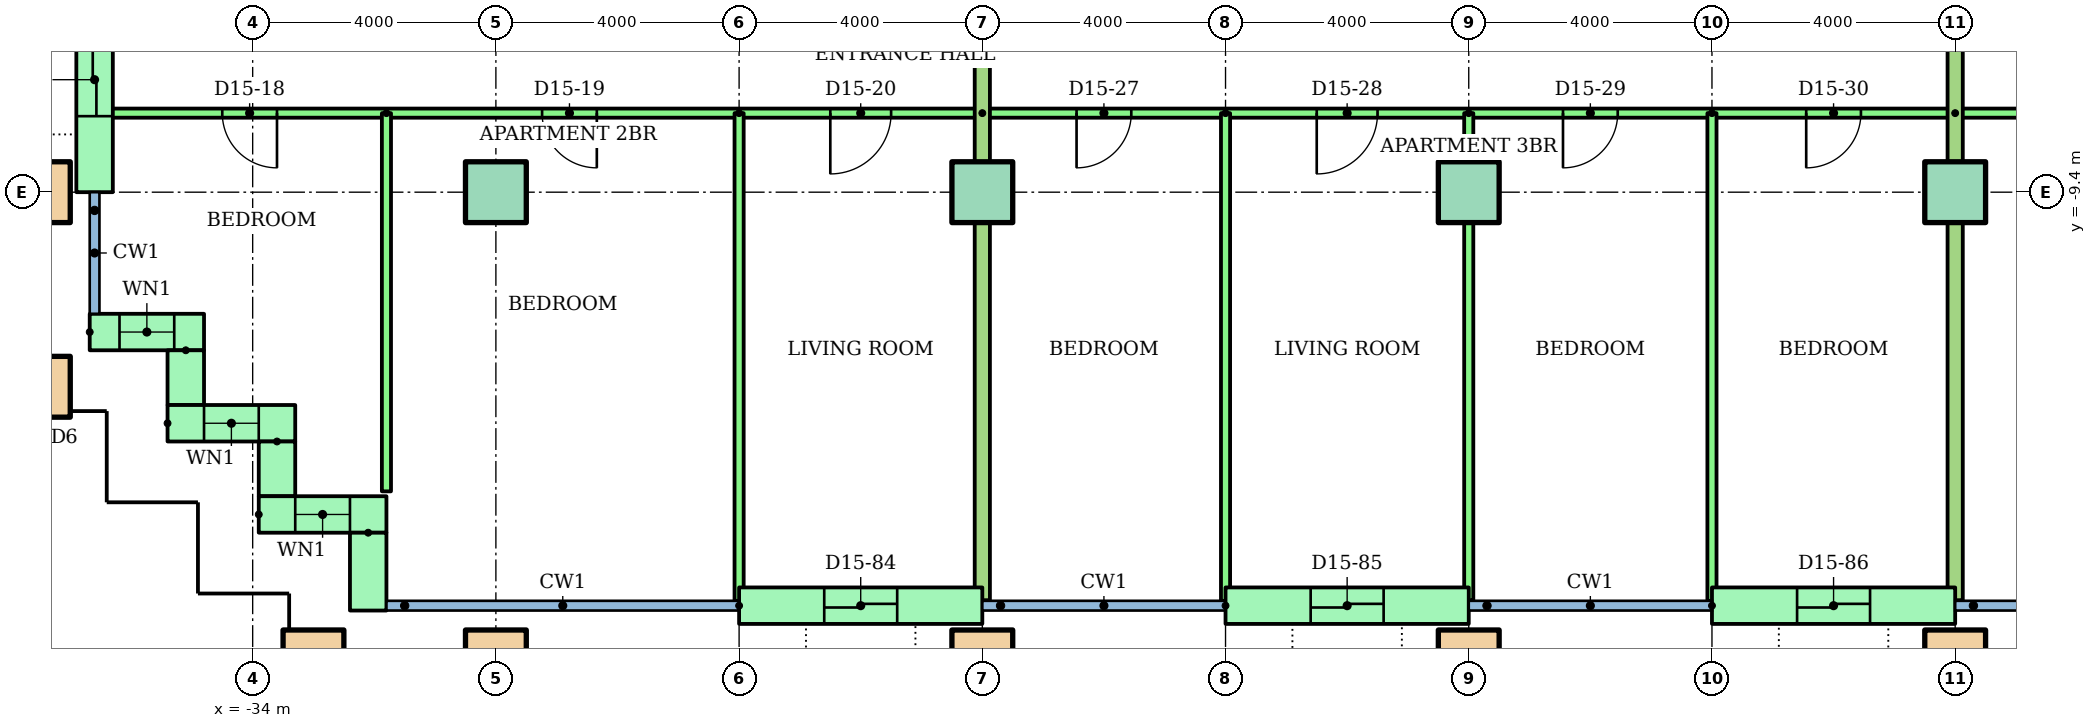
"""IFC4 building model, lengths in metres.
Left out: names, types, materials, properties, quantities, classifications, styles, units other than length and angle.
Written with IfcOpenShell. Run it as: python <this file> out.ifc"""

import sys

from ifc_helpers import new_model, si_unit, direction, frame, frame_2d, origin, origin_2d, place, context, subcontext, project, spatial, rectangle, hollow_rectangle, extrude, element, fill, save


model = new_model("IFC4")
c1 = context("Model", 3, precision=1e-05, world=origin(), true_north=direction((0.0, 1.0)))
c2 = subcontext(c1, "Body", "Model", "MODEL_VIEW")
j1 = project(units=[si_unit("LENGTHUNIT", "METRE"), si_unit("PLANEANGLEUNIT", "RADIAN")], contexts=[c1])
p1 = place(None, origin())
s1 = spatial("IfcSite", under=j1, at=p1, CompositionType="ELEMENT")
p2 = place(p1, origin())
s2 = spatial("IfcBuilding", under=s1, at=p2, CompositionType="ELEMENT")
p3 = place(p2, frame((0.0, 0.0, 57.6)))
s3 = spatial("IfcBuildingStorey", under=s2, at=p3, CompositionType="ELEMENT", Elevation=57.6)
for number, where in (
    (1, (-33.0, -17.1, 0.0)),
    (2, (-30.0, -17.1, 0.0)),
    (3, (-22.0, -17.1, 0.0)),
    (4, (-14.0, -17.1, 0.0)),
    (5, (-6.0, -17.1, 0.0)),
    (6, (-37.5, -12.6, 0.0)),
    (7, (-37.5, -9.4, 0.0)),
):
    element("IfcColumn", number, at=place(p3, frame(where)), inside=s3, PredefinedType="COLUMN", context=c2, shape_type="SweptSolid", body=[
        extrude(hollow_rectangle(XDim=1.0, YDim=1.0, WallThickness=0.05, at=origin_2d()), origin(), (0.0, 0.0, 1.0), 3.2),
    ])
for number, where in (
    (8, (-30.0, -9.4, 0.0)),
    (9, (-22.0, -9.4, 0.0)),
    (10, (-14.0, -9.4, 0.0)),
    (11, (-6.0, -9.4, 0.0)),
):
    element("IfcColumn", number, at=place(p3, frame(where)), inside=s3, PredefinedType="COLUMN", context=c2, shape_type="SweptSolid", body=[
        extrude(rectangle(XDim=1.0, YDim=1.0, at=origin_2d()), origin(), (0.0, 0.0, 1.0), 3.2),
    ])
p4 = place(p3, frame((-36.6, -5.7, 0.0), z_axis=(0.0, 0.0, 1.0), x_axis=(0.0, -1.0, 0.0)))
e12 = element("IfcWall", 12, at=p4, inside=s3, PredefinedType="STANDARD", context=c2, shape_type="SweptSolid", body=[
    extrude(rectangle(XDim=3.7, YDim=0.6, at=frame_2d((1.85, 0.0))), origin(), (0.0, 0.0, 1.0), 2.92),
])
p5 = place(p4, frame((1.25, 0.0, 0.0)))
e13 = element("IfcOpeningElement", 13, at=p5, cuts=e12, PredefinedType="OPENING", context=c2, shape_type="SweptSolid", body=[
    extrude(rectangle(XDim=1.2, YDim=2.1, at=frame_2d((0.6, 1.05))), frame((0.0, 0.31, 0.0), z_axis=(0.0, -1.0, 0.0), x_axis=(1.0, 0.0, 0.0)), (0.0, 0.0, 1.0), 0.62),
])
p6 = place(p3, frame((-36.68, -11.7, 0.0)))
e14 = element("IfcWall", 14, at=p6, inside=s3, PredefinedType="STANDARD", context=c2, shape_type="SweptSolid", body=[
    extrude(rectangle(XDim=1.88, YDim=0.6, at=frame_2d((0.94, 0.0))), origin(), (0.0, 0.0, 1.0), 2.92),
])
p7 = place(p6, frame((0.49, 0.0, 0.9)))
e15 = element("IfcOpeningElement", 15, at=p7, cuts=e14, PredefinedType="OPENING", context=c2, shape_type="SweptSolid", body=[
    extrude(rectangle(XDim=0.9, YDim=1.5, at=frame_2d((0.45, 0.75))), frame((0.0, 0.31, 0.0), z_axis=(0.0, -1.0, 0.0), x_axis=(1.0, 0.0, 0.0)), (0.0, 0.0, 1.0), 0.62),
])
p8 = place(p3, frame((-35.1, -12.0, 0.0), z_axis=(0.0, 0.0, 1.0), x_axis=(0.0, -1.0, 0.0)))
e16 = element("IfcWall", 16, at=p8, inside=s3, PredefinedType="STANDARD", context=c2, shape_type="SweptSolid", body=[
    extrude(rectangle(XDim=0.9, YDim=0.6, at=frame_2d((0.45, 0.0))), origin(), (0.0, 0.0, 1.0), 2.92),
])
p9 = place(p3, frame((-35.4, -13.2, 0.0)))
e17 = element("IfcWall", 17, at=p9, inside=s3, PredefinedType="STANDARD", context=c2, shape_type="SweptSolid", body=[
    extrude(rectangle(XDim=2.1, YDim=0.6, at=frame_2d((1.05, 0.0))), origin(), (0.0, 0.0, 1.0), 2.92),
])
p10 = place(p9, frame((0.6, 0.0, 0.9)))
e18 = element("IfcOpeningElement", 18, at=p10, cuts=e17, PredefinedType="OPENING", context=c2, shape_type="SweptSolid", body=[
    extrude(rectangle(XDim=0.9, YDim=1.5, at=frame_2d((0.45, 0.75))), frame((0.0, 0.31, 0.0), z_axis=(0.0, -1.0, 0.0), x_axis=(1.0, 0.0, 0.0)), (0.0, 0.0, 1.0), 0.62),
])
p11 = place(p3, frame((-33.6, -13.5, 0.0), z_axis=(0.0, 0.0, 1.0), x_axis=(0.0, -1.0, 0.0)))
e19 = element("IfcWall", 19, at=p11, inside=s3, PredefinedType="STANDARD", context=c2, shape_type="SweptSolid", body=[
    extrude(rectangle(XDim=0.9, YDim=0.6, at=frame_2d((0.45, 0.0))), origin(), (0.0, 0.0, 1.0), 2.92),
])
p12 = place(p3, frame((-33.9, -14.7, 0.0)))
e20 = element("IfcWall", 20, at=p12, inside=s3, PredefinedType="STANDARD", context=c2, shape_type="SweptSolid", body=[
    extrude(rectangle(XDim=2.1, YDim=0.6, at=frame_2d((1.05, 0.0))), origin(), (0.0, 0.0, 1.0), 2.92),
])
p13 = place(p12, frame((0.6, 0.0, 0.9)))
e21 = element("IfcOpeningElement", 21, at=p13, cuts=e20, PredefinedType="OPENING", context=c2, shape_type="SweptSolid", body=[
    extrude(rectangle(XDim=0.9, YDim=1.5, at=frame_2d((0.45, 0.75))), frame((0.0, 0.31, 0.0), z_axis=(0.0, -1.0, 0.0), x_axis=(1.0, 0.0, 0.0)), (0.0, 0.0, 1.0), 0.62),
])
p14 = place(p3, frame((-32.1, -15.0, 0.0), z_axis=(0.0, 0.0, 1.0), x_axis=(0.0, -1.0, 0.0)))
e22 = element("IfcWall", 22, at=p14, inside=s3, PredefinedType="STANDARD", context=c2, shape_type="SweptSolid", body=[
    extrude(rectangle(XDim=1.28, YDim=0.6, at=frame_2d((0.64, 0.0))), origin(), (0.0, 0.0, 1.0), 2.92),
])
p15 = place(p3, frame((-26.0, -16.2, 0.0)))
e23 = element("IfcWall", 23, at=p15, inside=s3, PredefinedType="STANDARD", context=c2, shape_type="SweptSolid", body=[
    extrude(rectangle(XDim=4.0, YDim=0.6, at=frame_2d((2.0, 0.0))), origin(), (0.0, 0.0, 1.0), 2.92),
])
p16 = place(p15, frame((1.4, 0.0, 0.0)))
e24 = element("IfcOpeningElement", 24, at=p16, cuts=e23, PredefinedType="OPENING", context=c2, shape_type="SweptSolid", body=[
    extrude(rectangle(XDim=1.2, YDim=2.1, at=frame_2d((0.6, 1.05))), frame((0.0, 0.31, 0.0), z_axis=(0.0, -1.0, 0.0), x_axis=(1.0, 0.0, 0.0)), (0.0, 0.0, 1.0), 0.62),
])
p17 = place(p3, frame((-18.0, -16.2, 0.0)))
e25 = element("IfcWall", 25, at=p17, inside=s3, PredefinedType="STANDARD", context=c2, shape_type="SweptSolid", body=[
    extrude(rectangle(XDim=4.0, YDim=0.6, at=frame_2d((2.0, 0.0))), origin(), (0.0, 0.0, 1.0), 2.92),
])
p18 = place(p17, frame((1.4, 0.0, 0.0)))
e26 = element("IfcOpeningElement", 26, at=p18, cuts=e25, PredefinedType="OPENING", context=c2, shape_type="SweptSolid", body=[
    extrude(rectangle(XDim=1.2, YDim=2.1, at=frame_2d((0.6, 1.05))), frame((0.0, 0.31, 0.0), z_axis=(0.0, -1.0, 0.0), x_axis=(1.0, 0.0, 0.0)), (0.0, 0.0, 1.0), 0.62),
])
p19 = place(p3, frame((-10.0, -16.2, 0.0)))
e27 = element("IfcWall", 27, at=p19, inside=s3, PredefinedType="STANDARD", context=c2, shape_type="SweptSolid", body=[
    extrude(rectangle(XDim=4.0, YDim=0.6, at=frame_2d((2.0, 0.0))), origin(), (0.0, 0.0, 1.0), 2.92),
])
p20 = place(p19, frame((1.4, 0.0, 0.0)))
e28 = element("IfcOpeningElement", 28, at=p20, cuts=e27, PredefinedType="OPENING", context=c2, shape_type="SweptSolid", body=[
    extrude(rectangle(XDim=1.2, YDim=2.1, at=frame_2d((0.6, 1.05))), frame((0.0, 0.31, 0.0), z_axis=(0.0, -1.0, 0.0), x_axis=(1.0, 0.0, 0.0)), (0.0, 0.0, 1.0), 0.62),
])
p21 = place(p3, frame((-22.0, -8.1, 0.0), z_axis=(0.0, 0.0, 1.0), x_axis=(-1.0, 0.0, 0.0)))
e29 = element("IfcWall", 29, at=p21, inside=s3, PredefinedType="PARTITIONING", context=c2, shape_type="SweptSolid", body=[
    extrude(rectangle(XDim=14.51, YDim=0.15, at=frame_2d((7.255, 0.0))), origin(), (0.0, 0.0, 1.0), 2.4),
])
p22 = place(p21, frame((11.6, 0.0, 0.0)))
e30 = element("IfcOpeningElement", 30, at=p22, cuts=e29, PredefinedType="OPENING", context=c2, shape_type="SweptSolid", body=[
    extrude(rectangle(XDim=0.9, YDim=2.1, at=frame_2d((0.45, 1.05))), frame((0.0, 0.085, 0.0), z_axis=(0.0, -1.0, 0.0), x_axis=(1.0, 0.0, 0.0)), (0.0, 0.0, 1.0), 0.17),
])
p23 = place(p21, frame((6.34, 0.0, 0.0)))
e31 = element("IfcOpeningElement", 31, at=p23, cuts=e29, PredefinedType="OPENING", context=c2, shape_type="SweptSolid", body=[
    extrude(rectangle(XDim=0.9, YDim=2.1, at=frame_2d((0.45, 1.05))), frame((0.0, 0.085, 0.0), z_axis=(0.0, -1.0, 0.0), x_axis=(1.0, 0.0, 0.0)), (0.0, 0.0, 1.0), 0.17),
])
p24 = place(p21, frame((1.5, 0.0, 0.0)))
e32 = element("IfcOpeningElement", 32, at=p24, cuts=e29, PredefinedType="OPENING", context=c2, shape_type="SweptSolid", body=[
    extrude(rectangle(XDim=1.0, YDim=2.1, at=frame_2d((0.5, 1.05))), frame((0.0, 0.085, 0.0), z_axis=(0.0, -1.0, 0.0), x_axis=(1.0, 0.0, 0.0)), (0.0, 0.0, 1.0), 0.17),
])
p25 = place(p3, frame((-31.8, -8.1, 0.0), z_axis=(0.0, 0.0, 1.0), x_axis=(0.0, -1.0, 0.0)))
e33 = element("IfcWall", 33, at=p25, inside=s3, PredefinedType="PARTITIONING", context=c2, shape_type="SweptSolid", body=[
    extrude(rectangle(XDim=6.22, YDim=0.15, at=frame_2d((3.11, 0.0))), origin(), (0.0, 0.0, 1.0), 2.4),
])
p26 = place(p3, frame((-26.0, -8.1, 0.0), z_axis=(0.0, 0.0, 1.0), x_axis=(0.0, -1.0, 0.0)))
e34 = element("IfcWall", 34, at=p26, inside=s3, PredefinedType="PARTITIONING", context=c2, shape_type="SweptSolid", body=[
    extrude(rectangle(XDim=8.021, YDim=0.15, at=frame_2d((4.01, 0.0))), origin(), (0.0, 0.0, 1.0), 2.4),
])
p27 = place(p3, frame((-6.0, -8.1, 0.0), z_axis=(0.0, 0.0, 1.0), x_axis=(-1.0, 0.0, 0.0)))
e35 = element("IfcWall", 35, at=p27, inside=s3, PredefinedType="PARTITIONING", context=c2, shape_type="SweptSolid", body=[
    extrude(rectangle(XDim=16.0, YDim=0.15, at=frame_2d((8.0, 0.0))), origin(), (0.0, 0.0, 1.0), 2.4),
])
p28 = place(p27, frame((13.55, 0.0, 0.0)))
e36 = element("IfcOpeningElement", 36, at=p28, cuts=e35, PredefinedType="OPENING", context=c2, shape_type="SweptSolid", body=[
    extrude(rectangle(XDim=0.9, YDim=2.1, at=frame_2d((0.45, 1.05))), frame((0.0, 0.085, 0.0), z_axis=(0.0, -1.0, 0.0), x_axis=(1.0, 0.0, 0.0)), (0.0, 0.0, 1.0), 0.17),
])
p29 = place(p27, frame((9.5, 0.0, 0.0)))
e37 = element("IfcOpeningElement", 37, at=p29, cuts=e35, PredefinedType="OPENING", context=c2, shape_type="SweptSolid", body=[
    extrude(rectangle(XDim=1.0, YDim=2.1, at=frame_2d((0.5, 1.05))), frame((0.0, 0.085, 0.0), z_axis=(0.0, -1.0, 0.0), x_axis=(1.0, 0.0, 0.0)), (0.0, 0.0, 1.0), 0.17),
])
p30 = place(p27, frame((5.55, 0.0, 0.0)))
e38 = element("IfcOpeningElement", 38, at=p30, cuts=e35, PredefinedType="OPENING", context=c2, shape_type="SweptSolid", body=[
    extrude(rectangle(XDim=0.9, YDim=2.1, at=frame_2d((0.45, 1.05))), frame((0.0, 0.085, 0.0), z_axis=(0.0, -1.0, 0.0), x_axis=(1.0, 0.0, 0.0)), (0.0, 0.0, 1.0), 0.17),
])
p31 = place(p27, frame((1.55, 0.0, 0.0)))
e39 = element("IfcOpeningElement", 39, at=p31, cuts=e35, PredefinedType="OPENING", context=c2, shape_type="SweptSolid", body=[
    extrude(rectangle(XDim=0.9, YDim=2.1, at=frame_2d((0.45, 1.05))), frame((0.0, 0.085, 0.0), z_axis=(0.0, -1.0, 0.0), x_axis=(1.0, 0.0, 0.0)), (0.0, 0.0, 1.0), 0.17),
])
p32 = place(p3, frame((-18.0, -8.1, 0.0), z_axis=(0.0, 0.0, 1.0), x_axis=(0.0, -1.0, 0.0)))
e40 = element("IfcWall", 40, at=p32, inside=s3, PredefinedType="PARTITIONING", context=c2, shape_type="SweptSolid", body=[
    extrude(rectangle(XDim=8.021, YDim=0.15, at=frame_2d((4.01, 0.0))), origin(), (0.0, 0.0, 1.0), 2.4),
])
p33 = place(p3, frame((-14.0, -8.1, 0.0), z_axis=(0.0, 0.0, 1.0), x_axis=(0.0, -1.0, 0.0)))
e41 = element("IfcWall", 41, at=p33, inside=s3, PredefinedType="PARTITIONING", context=c2, shape_type="SweptSolid", body=[
    extrude(rectangle(XDim=8.01, YDim=0.15, at=frame_2d((4.005, 0.0))), origin(), (0.0, 0.0, 1.0), 2.4),
])
p34 = place(p3, frame((-10.0, -8.1, 0.0), z_axis=(0.0, 0.0, 1.0), x_axis=(0.0, -1.0, 0.0)))
e42 = element("IfcWall", 42, at=p34, inside=s3, PredefinedType="PARTITIONING", context=c2, shape_type="SweptSolid", body=[
    extrude(rectangle(XDim=8.021, YDim=0.15, at=frame_2d((4.01, 0.0))), origin(), (0.0, 0.0, 1.0), 2.4),
])
p35 = place(p3, frame((-22.0, -1.4, 0.0), z_axis=(0.0, 0.0, 1.0), x_axis=(0.0, -1.0, 0.0)))
e43 = element("IfcWall", 43, at=p35, inside=s3, PredefinedType="PARTITIONING", context=c2, shape_type="SweptSolid", body=[
    extrude(rectangle(XDim=14.71, YDim=0.25, at=frame_2d((7.355, 0.0))), origin(), (0.0, 0.0, 1.0), 2.4),
])
p36 = place(p3, frame((10.0, -8.1, 0.0), z_axis=(0.0, 0.0, 1.0), x_axis=(-1.0, 0.0, 0.0)))
e44 = element("IfcWall", 44, at=p36, inside=s3, PredefinedType="PARTITIONING", context=c2, shape_type="SweptSolid", body=[
    extrude(rectangle(XDim=16.0, YDim=0.15, at=frame_2d((8.0, 0.0))), origin(), (0.0, 0.0, 1.0), 2.4),
])
p37 = place(p36, frame((13.55, 0.0, 0.0)))
e45 = element("IfcOpeningElement", 45, at=p37, cuts=e44, PredefinedType="OPENING", context=c2, shape_type="SweptSolid", body=[
    extrude(rectangle(XDim=0.9, YDim=2.1, at=frame_2d((0.45, 1.05))), frame((0.0, 0.085, 0.0), z_axis=(0.0, -1.0, 0.0), x_axis=(1.0, 0.0, 0.0)), (0.0, 0.0, 1.0), 0.17),
])
p38 = place(p36, frame((9.5, 0.0, 0.0)))
e46 = element("IfcOpeningElement", 46, at=p38, cuts=e44, PredefinedType="OPENING", context=c2, shape_type="SweptSolid", body=[
    extrude(rectangle(XDim=1.0, YDim=2.1, at=frame_2d((0.5, 1.05))), frame((0.0, 0.085, 0.0), z_axis=(0.0, -1.0, 0.0), x_axis=(1.0, 0.0, 0.0)), (0.0, 0.0, 1.0), 0.17),
])
p39 = place(p36, frame((5.55, 0.0, 0.0)))
e47 = element("IfcOpeningElement", 47, at=p39, cuts=e44, PredefinedType="OPENING", context=c2, shape_type="SweptSolid", body=[
    extrude(rectangle(XDim=0.9, YDim=2.1, at=frame_2d((0.45, 1.05))), frame((0.0, 0.085, 0.0), z_axis=(0.0, -1.0, 0.0), x_axis=(1.0, 0.0, 0.0)), (0.0, 0.0, 1.0), 0.17),
])
p40 = place(p36, frame((1.55, 0.0, 0.0)))
e48 = element("IfcOpeningElement", 48, at=p40, cuts=e44, PredefinedType="OPENING", context=c2, shape_type="SweptSolid", body=[
    extrude(rectangle(XDim=0.9, YDim=2.1, at=frame_2d((0.45, 1.05))), frame((0.0, 0.085, 0.0), z_axis=(0.0, -1.0, 0.0), x_axis=(1.0, 0.0, 0.0)), (0.0, 0.0, 1.0), 0.17),
])
p41 = place(p3, frame((-6.0, -1.4, 0.0), z_axis=(0.0, 0.0, 1.0), x_axis=(0.0, -1.0, 0.0)))
e49 = element("IfcWall", 49, at=p41, inside=s3, PredefinedType="PARTITIONING", context=c2, shape_type="SweptSolid", body=[
    extrude(rectangle(XDim=14.71, YDim=0.25, at=frame_2d((7.355, 0.0))), origin(), (0.0, 0.0, 1.0), 2.4),
])
p42 = place(p7, origin())
e50 = element("IfcWindow", 50, at=p42, inside=s3, PartitioningType="SINGLE_PANEL", PredefinedType="WINDOW", context=c2, shape_type="SweptSolid", body=[
    extrude(rectangle(XDim=0.9, YDim=1.5, at=frame_2d((0.45, 0.75))), frame((0.0, 0.03, 0.0), z_axis=(0.0, -1.0, 0.0), x_axis=(1.0, 0.0, 0.0)), (0.0, 0.0, 1.0), 0.06),
])
fill(e15, e50)
p43 = place(p10, origin())
e51 = element("IfcWindow", 51, at=p43, inside=s3, PartitioningType="SINGLE_PANEL", PredefinedType="WINDOW", context=c2, shape_type="SweptSolid", body=[
    extrude(rectangle(XDim=0.9, YDim=1.5, at=frame_2d((0.45, 0.75))), frame((0.0, 0.03, 0.0), z_axis=(0.0, -1.0, 0.0), x_axis=(1.0, 0.0, 0.0)), (0.0, 0.0, 1.0), 0.06),
])
fill(e18, e51)
p44 = place(p13, origin())
e52 = element("IfcWindow", 52, at=p44, inside=s3, PartitioningType="SINGLE_PANEL", PredefinedType="WINDOW", context=c2, shape_type="SweptSolid", body=[
    extrude(rectangle(XDim=0.9, YDim=1.5, at=frame_2d((0.45, 0.75))), frame((0.0, 0.03, 0.0), z_axis=(0.0, -1.0, 0.0), x_axis=(1.0, 0.0, 0.0)), (0.0, 0.0, 1.0), 0.06),
])
fill(e21, e52)
p45 = place(p22, origin())
e53 = element("IfcDoor", 53, at=p45, inside=s3, OperationType="SINGLE_SWING_LEFT", PredefinedType="DOOR", context=c2, shape_type="SweptSolid", body=[
    extrude(rectangle(XDim=0.9, YDim=2.1, at=frame_2d((0.45, 1.05))), frame((0.0, 0.025, 0.0), z_axis=(0.0, -1.0, 0.0), x_axis=(1.0, 0.0, 0.0)), (0.0, 0.0, 1.0), 0.05),
])
fill(e30, e53)
p46 = place(p23, origin())
e54 = element("IfcDoor", 54, at=p46, inside=s3, OperationType="SINGLE_SWING_LEFT", PredefinedType="DOOR", context=c2, shape_type="SweptSolid", body=[
    extrude(rectangle(XDim=0.9, YDim=2.1, at=frame_2d((0.45, 1.05))), frame((0.0, 0.025, 0.0), z_axis=(0.0, -1.0, 0.0), x_axis=(1.0, 0.0, 0.0)), (0.0, 0.0, 1.0), 0.05),
])
fill(e31, e54)
p47 = place(p24, origin())
e55 = element("IfcDoor", 55, at=p47, inside=s3, OperationType="SINGLE_SWING_RIGHT", PredefinedType="DOOR", context=c2, shape_type="SweptSolid", body=[
    extrude(rectangle(XDim=1.0, YDim=2.1, at=frame_2d((0.5, 1.05))), frame((0.0, 0.025, 0.0), z_axis=(0.0, -1.0, 0.0), x_axis=(1.0, 0.0, 0.0)), (0.0, 0.0, 1.0), 0.05),
])
fill(e32, e55)
p48 = place(p28, origin())
e56 = element("IfcDoor", 56, at=p48, inside=s3, OperationType="SINGLE_SWING_RIGHT", PredefinedType="DOOR", context=c2, shape_type="SweptSolid", body=[
    extrude(rectangle(XDim=0.9, YDim=2.1, at=frame_2d((0.45, 1.05))), frame((0.0, 0.025, 0.0), z_axis=(0.0, -1.0, 0.0), x_axis=(1.0, 0.0, 0.0)), (0.0, 0.0, 1.0), 0.05),
])
fill(e36, e56)
p49 = place(p29, origin())
e57 = element("IfcDoor", 57, at=p49, inside=s3, OperationType="SINGLE_SWING_RIGHT", PredefinedType="DOOR", context=c2, shape_type="SweptSolid", body=[
    extrude(rectangle(XDim=1.0, YDim=2.1, at=frame_2d((0.5, 1.05))), frame((0.0, 0.025, 0.0), z_axis=(0.0, -1.0, 0.0), x_axis=(1.0, 0.0, 0.0)), (0.0, 0.0, 1.0), 0.05),
])
fill(e37, e57)
p50 = place(p30, origin())
e58 = element("IfcDoor", 58, at=p50, inside=s3, OperationType="SINGLE_SWING_RIGHT", PredefinedType="DOOR", context=c2, shape_type="SweptSolid", body=[
    extrude(rectangle(XDim=0.9, YDim=2.1, at=frame_2d((0.45, 1.05))), frame((0.0, 0.025, 0.0), z_axis=(0.0, -1.0, 0.0), x_axis=(1.0, 0.0, 0.0)), (0.0, 0.0, 1.0), 0.05),
])
fill(e38, e58)
p51 = place(p31, origin())
e59 = element("IfcDoor", 59, at=p51, inside=s3, OperationType="SINGLE_SWING_RIGHT", PredefinedType="DOOR", context=c2, shape_type="SweptSolid", body=[
    extrude(rectangle(XDim=0.9, YDim=2.1, at=frame_2d((0.45, 1.05))), frame((0.0, 0.025, 0.0), z_axis=(0.0, -1.0, 0.0), x_axis=(1.0, 0.0, 0.0)), (0.0, 0.0, 1.0), 0.05),
])
fill(e39, e59)
p52 = place(p5, origin())
e60 = element("IfcDoor", 60, at=p52, inside=s3, OperationType="SLIDING_TO_LEFT", PredefinedType="DOOR", context=c2, shape_type="SweptSolid", body=[
    extrude(rectangle(XDim=1.2, YDim=2.1, at=frame_2d((0.6, 1.05))), frame((0.0, 0.025, 0.0), z_axis=(0.0, -1.0, 0.0), x_axis=(1.0, 0.0, 0.0)), (0.0, 0.0, 1.0), 0.05),
])
fill(e13, e60)
p53 = place(p16, origin())
e61 = element("IfcDoor", 61, at=p53, inside=s3, OperationType="SLIDING_TO_LEFT", PredefinedType="DOOR", context=c2, shape_type="SweptSolid", body=[
    extrude(rectangle(XDim=1.2, YDim=2.1, at=frame_2d((0.6, 1.05))), frame((0.0, 0.025, 0.0), z_axis=(0.0, -1.0, 0.0), x_axis=(1.0, 0.0, 0.0)), (0.0, 0.0, 1.0), 0.05),
])
fill(e24, e61)
p54 = place(p18, origin())
e62 = element("IfcDoor", 62, at=p54, inside=s3, OperationType="SLIDING_TO_LEFT", PredefinedType="DOOR", context=c2, shape_type="SweptSolid", body=[
    extrude(rectangle(XDim=1.2, YDim=2.1, at=frame_2d((0.6, 1.05))), frame((0.0, 0.025, 0.0), z_axis=(0.0, -1.0, 0.0), x_axis=(1.0, 0.0, 0.0)), (0.0, 0.0, 1.0), 0.05),
])
fill(e26, e62)
p55 = place(p20, origin())
e63 = element("IfcDoor", 63, at=p55, inside=s3, OperationType="SLIDING_TO_LEFT", PredefinedType="DOOR", context=c2, shape_type="SweptSolid", body=[
    extrude(rectangle(XDim=1.2, YDim=2.1, at=frame_2d((0.6, 1.05))), frame((0.0, 0.025, 0.0), z_axis=(0.0, -1.0, 0.0), x_axis=(1.0, 0.0, 0.0)), (0.0, 0.0, 1.0), 0.05),
])
fill(e28, e63)
save(model, sys.argv[1])
